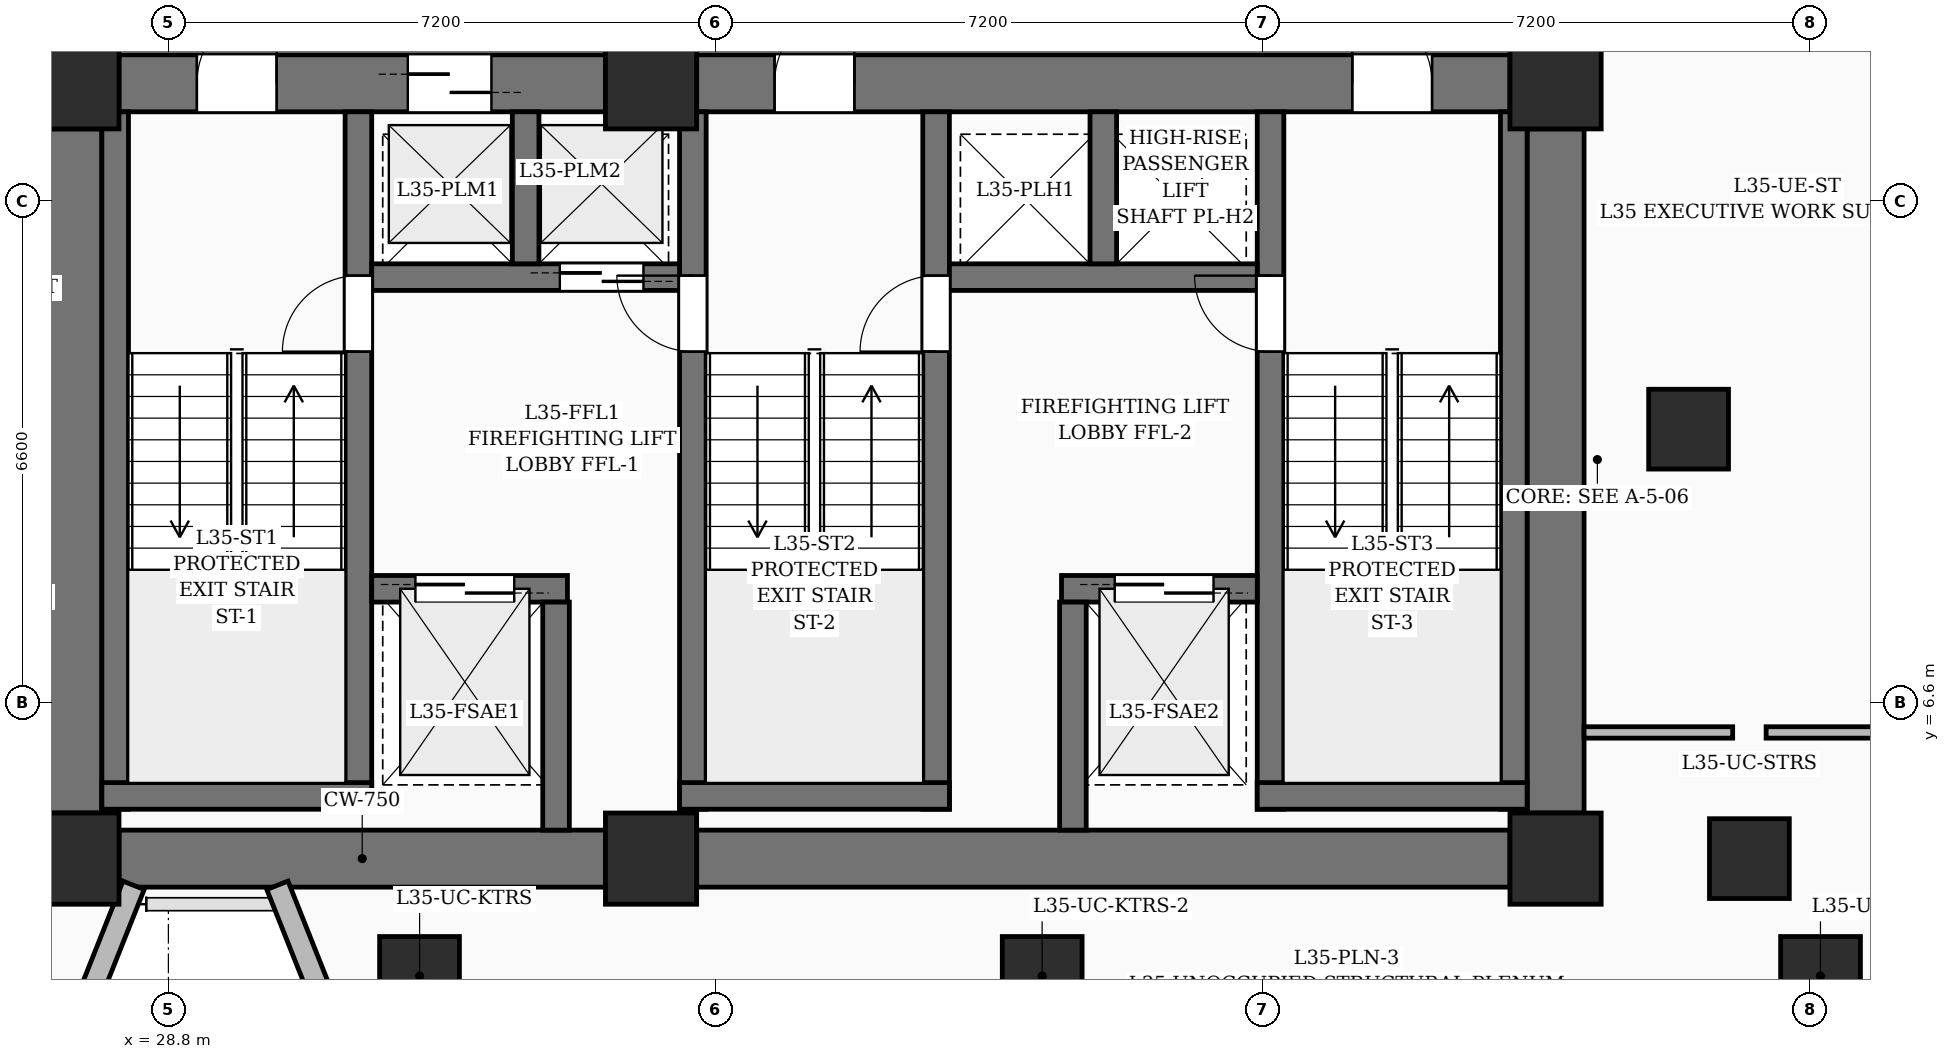
"""IFC4 building model, lengths in metres.
Left out: names, types, materials, properties, quantities, classifications, styles, units other than length and angle.
Written with IfcOpenShell. Run it as: python <this file> out.ifc"""

import sys

from ifc_helpers import new_model, si_unit, direction, frame, frame_2d, origin, origin_2d, place, context, subcontext, project, spatial, rectangle, extrude, element, fill, save


model = new_model("IFC4")
c1 = context("Model", 3, precision=1e-05, world=origin(), true_north=direction((0.0, 1.0)))
c2 = subcontext(c1, "Body", "Model", "MODEL_VIEW")
j1 = project(units=[si_unit("LENGTHUNIT", "METRE"), si_unit("PLANEANGLEUNIT", "RADIAN")], contexts=[c1])
p1 = place(None, origin())
s1 = spatial("IfcSite", under=j1, at=p1, CompositionType="ELEMENT")
p2 = place(p1, origin())
s2 = spatial("IfcBuilding", under=s1, at=p2, CompositionType="ELEMENT")
p3 = place(p2, frame((0.0, 0.0, 139.2)))
s3 = spatial("IfcBuildingStorey", under=s2, at=p3, CompositionType="ELEMENT", Elevation=139.2)
for number, where, z_axis, x_axis in (
    (1, (27.55, 4.55, 0.0), (0.0, 0.0, 1.0), (1.0, 0.0, 0.0)),
    (2, (35.15, 4.55, 0.0), (0.0, 0.0, 1.0), (1.0, 0.0, 0.0)),
    (3, (47.05, 4.55, 0.0), (0.0, 0.0, 1.0), (1.0, 0.0, 0.0)),
    (4, (27.55, 14.75, 0.0), (0.0, 0.0, 1.0), (1.0, 0.0, 0.0)),
    (5, (35.15, 14.75, 0.0), (0.0, 0.0, 1.0), (1.0, 0.0, 0.0)),
    (6, (47.05, 14.75, 0.0), (0.0, 0.0, 1.0), (1.0, 0.0, 0.0)),
):
    element("IfcColumn", number, at=place(p3, frame(where, z_axis=z_axis, x_axis=x_axis)), inside=s3, PredefinedType="COLUMN", context=c2, shape_type="SweptSolid", body=[
        extrude(rectangle(XDim=1.2, YDim=1.2, at=origin_2d()), origin(), (0.0, 0.0, 1.0), 3.6),
    ])
for number, where, z_axis, x_axis in (
    (7, (49.6, 4.55, 0.0), (0.0, 0.0, 1.0), (1.0, 0.0, 0.0)),
    (8, (48.8, 10.2, 0.0), (0.0, 0.0, 1.0), (1.0, 0.0, 0.0)),
):
    element("IfcColumn", number, at=place(p3, frame(where, z_axis=z_axis, x_axis=x_axis)), inside=s3, PredefinedType="COLUMN", context=c2, shape_type="SweptSolid", body=[
        extrude(rectangle(XDim=1.05, YDim=1.05, at=origin_2d()), origin(), (0.0, 0.0, 1.0), 3.6),
    ])
p4 = place(p3, frame((28.15, 4.55, 0.0), z_axis=(0.0, 0.0, 1.0), x_axis=(1.0, 0.0, 0.0)))
e9 = element("IfcWall", 9, at=p4, inside=s3, PredefinedType="SHEAR", context=c2, shape_type="SweptSolid", body=[
    extrude(rectangle(XDim=6.4, YDim=0.75, at=frame_2d((3.2, 0.0))), origin(), (0.0, 0.0, 1.0), 3.6),
])
p5 = place(p3, frame((35.75, 4.55, 0.0), z_axis=(0.0, 0.0, 1.0), x_axis=(1.0, 0.0, 0.0)))
e10 = element("IfcWall", 10, at=p5, inside=s3, PredefinedType="SHEAR", context=c2, shape_type="SweptSolid", body=[
    extrude(rectangle(XDim=10.7, YDim=0.75, at=frame_2d((5.35, 0.0))), origin(), (0.0, 0.0, 1.0), 3.6),
])
p6 = place(p3, frame((28.15, 14.75, 0.0), z_axis=(0.0, 0.0, 1.0), x_axis=(1.0, 0.0, 0.0)))
e11 = element("IfcWall", 11, at=p6, inside=s3, PredefinedType="SHEAR", context=c2, shape_type="SweptSolid", body=[
    extrude(rectangle(XDim=6.4, YDim=0.75, at=frame_2d((3.2, 0.0))), origin(), (0.0, 0.0, 1.0), 3.6),
])
p7 = place(p6, frame((1.025, 0.0, 0.0)))
e12 = element("IfcOpeningElement", 12, at=p7, cuts=e11, PredefinedType="OPENING", context=c2, shape_type="SweptSolid", body=[
    extrude(rectangle(XDim=1.05, YDim=2.15, at=frame_2d((0.525, 1.075))), frame((0.0, 0.385, 0.0), z_axis=(0.0, -1.0, 0.0), x_axis=(1.0, 0.0, 0.0)), (0.0, 0.0, 1.0), 0.77),
])
p8 = place(p6, frame((3.8, 0.0, 0.0)))
e13 = element("IfcOpeningElement", 13, at=p8, cuts=e11, PredefinedType="OPENING", context=c2, shape_type="SweptSolid", body=[
    extrude(rectangle(XDim=1.1, YDim=2.2, at=frame_2d((0.55, 1.1))), frame((0.0, 0.385, 0.0), z_axis=(0.0, -1.0, 0.0), x_axis=(1.0, 0.0, 0.0)), (0.0, 0.0, 1.0), 0.77),
])
p9 = place(p3, frame((35.75, 14.75, 0.0), z_axis=(0.0, 0.0, 1.0), x_axis=(1.0, 0.0, 0.0)))
e14 = element("IfcWall", 14, at=p9, inside=s3, PredefinedType="SHEAR", context=c2, shape_type="SweptSolid", body=[
    extrude(rectangle(XDim=10.7, YDim=0.75, at=frame_2d((5.35, 0.0))), origin(), (0.0, 0.0, 1.0), 3.6),
])
p10 = place(p9, frame((1.025, 0.0, 0.0)))
e15 = element("IfcOpeningElement", 15, at=p10, cuts=e14, PredefinedType="OPENING", context=c2, shape_type="SweptSolid", body=[
    extrude(rectangle(XDim=1.05, YDim=2.15, at=frame_2d((0.525, 1.075))), frame((0.0, 0.385, 0.0), z_axis=(0.0, -1.0, 0.0), x_axis=(1.0, 0.0, 0.0)), (0.0, 0.0, 1.0), 0.77),
])
p11 = place(p9, frame((8.625, 0.0, 0.0)))
e16 = element("IfcOpeningElement", 16, at=p11, cuts=e14, PredefinedType="OPENING", context=c2, shape_type="SweptSolid", body=[
    extrude(rectangle(XDim=1.05, YDim=2.15, at=frame_2d((0.525, 1.075))), frame((0.0, 0.385, 0.0), z_axis=(0.0, -1.0, 0.0), x_axis=(1.0, 0.0, 0.0)), (0.0, 0.0, 1.0), 0.77),
])
for number, where, z_axis, x_axis in (
    (17, (27.55, 5.15, 0.0), (0.0, 0.0, 1.0), (0.0, 1.0, 0.0)),
    (18, (47.05, 5.15, 0.0), (0.0, 0.0, 1.0), (0.0, 1.0, 0.0)),
):
    element("IfcWall", number, at=place(p3, frame(where, z_axis=z_axis, x_axis=x_axis)), inside=s3, PredefinedType="SHEAR", context=c2, shape_type="SweptSolid", body=[
        extrude(rectangle(XDim=9.0, YDim=0.75, at=frame_2d((4.5, 0.0))), origin(), (0.0, 0.0, 1.0), 3.6),
    ])
p12 = place(p3, frame((28.1, 5.2, 0.0), z_axis=(0.0, 0.0, 1.0), x_axis=(0.0, 1.0, 0.0)))
e19 = element("IfcWall", 19, at=p12, inside=s3, PredefinedType="SOLIDWALL", context=c2, shape_type="SweptSolid", body=[
    extrude(rectangle(XDim=9.175, YDim=0.35, at=frame_2d((4.587, 0.0))), origin(), (0.0, 0.0, 1.0), 3.6),
])
p13 = place(p3, frame((31.3, 5.2, 0.0), z_axis=(0.0, 0.0, 1.0), x_axis=(0.0, 1.0, 0.0)))
e20 = element("IfcWall", 20, at=p13, inside=s3, PredefinedType="SOLIDWALL", context=c2, shape_type="SweptSolid", body=[
    extrude(rectangle(XDim=9.175, YDim=0.35, at=frame_2d((4.587, 0.0))), origin(), (0.0, 0.0, 1.0), 3.6),
])
p14 = place(p13, frame((6.02, 0.0, 0.0)))
e21 = element("IfcOpeningElement", 21, at=p14, cuts=e20, PredefinedType="OPENING", context=c2, shape_type="SweptSolid", body=[
    extrude(rectangle(XDim=1.0, YDim=2.15, at=frame_2d((0.5, 1.075))), frame((0.0, 0.185, 0.0), z_axis=(0.0, -1.0, 0.0), x_axis=(1.0, 0.0, 0.0)), (0.0, 0.0, 1.0), 0.37),
])
p15 = place(p3, frame((27.925, 5.375, 0.0), z_axis=(0.0, 0.0, 1.0), x_axis=(1.0, 0.0, 0.0)))
e22 = element("IfcWall", 22, at=p15, inside=s3, PredefinedType="SOLIDWALL", context=c2, shape_type="SweptSolid", body=[
    extrude(rectangle(XDim=3.55, YDim=0.35, at=frame_2d((1.775, 0.0))), origin(), (0.0, 0.0, 1.0), 3.6),
])
p16 = place(p3, frame((35.7, 5.2, 0.0), z_axis=(0.0, 0.0, 1.0), x_axis=(0.0, 1.0, 0.0)))
e23 = element("IfcWall", 23, at=p16, inside=s3, PredefinedType="SOLIDWALL", context=c2, shape_type="SweptSolid", body=[
    extrude(rectangle(XDim=9.175, YDim=0.35, at=frame_2d((4.587, 0.0))), origin(), (0.0, 0.0, 1.0), 3.6),
])
p17 = place(p16, frame((6.02, 0.0, 0.0)))
e24 = element("IfcOpeningElement", 24, at=p17, cuts=e23, PredefinedType="OPENING", context=c2, shape_type="SweptSolid", body=[
    extrude(rectangle(XDim=1.0, YDim=2.15, at=frame_2d((0.5, 1.075))), frame((0.0, 0.185, 0.0), z_axis=(0.0, -1.0, 0.0), x_axis=(1.0, 0.0, 0.0)), (0.0, 0.0, 1.0), 0.37),
])
p18 = place(p3, frame((38.9, 5.2, 0.0), z_axis=(0.0, 0.0, 1.0), x_axis=(0.0, 1.0, 0.0)))
e25 = element("IfcWall", 25, at=p18, inside=s3, PredefinedType="SOLIDWALL", context=c2, shape_type="SweptSolid", body=[
    extrude(rectangle(XDim=9.175, YDim=0.35, at=frame_2d((4.587, 0.0))), origin(), (0.0, 0.0, 1.0), 3.6),
])
p19 = place(p18, frame((6.02, 0.0, 0.0)))
e26 = element("IfcOpeningElement", 26, at=p19, cuts=e25, PredefinedType="OPENING", context=c2, shape_type="SweptSolid", body=[
    extrude(rectangle(XDim=1.0, YDim=2.15, at=frame_2d((0.5, 1.075))), frame((0.0, 0.185, 0.0), z_axis=(0.0, -1.0, 0.0), x_axis=(1.0, 0.0, 0.0)), (0.0, 0.0, 1.0), 0.37),
])
p20 = place(p3, frame((35.525, 5.375, 0.0), z_axis=(0.0, 0.0, 1.0), x_axis=(1.0, 0.0, 0.0)))
e27 = element("IfcWall", 27, at=p20, inside=s3, PredefinedType="SOLIDWALL", context=c2, shape_type="SweptSolid", body=[
    extrude(rectangle(XDim=3.55, YDim=0.35, at=frame_2d((1.775, 0.0))), origin(), (0.0, 0.0, 1.0), 3.6),
])
p21 = place(p3, frame((43.3, 5.2, 0.0), z_axis=(0.0, 0.0, 1.0), x_axis=(0.0, 1.0, 0.0)))
e28 = element("IfcWall", 28, at=p21, inside=s3, PredefinedType="SOLIDWALL", context=c2, shape_type="SweptSolid", body=[
    extrude(rectangle(XDim=9.175, YDim=0.35, at=frame_2d((4.587, 0.0))), origin(), (0.0, 0.0, 1.0), 3.6),
])
p22 = place(p21, frame((6.02, 0.0, 0.0)))
e29 = element("IfcOpeningElement", 29, at=p22, cuts=e28, PredefinedType="OPENING", context=c2, shape_type="SweptSolid", body=[
    extrude(rectangle(XDim=1.0, YDim=2.15, at=frame_2d((0.5, 1.075))), frame((0.0, 0.185, 0.0), z_axis=(0.0, -1.0, 0.0), x_axis=(1.0, 0.0, 0.0)), (0.0, 0.0, 1.0), 0.37),
])
p23 = place(p3, frame((46.5, 5.2, 0.0), z_axis=(0.0, 0.0, 1.0), x_axis=(0.0, 1.0, 0.0)))
e30 = element("IfcWall", 30, at=p23, inside=s3, PredefinedType="SOLIDWALL", context=c2, shape_type="SweptSolid", body=[
    extrude(rectangle(XDim=9.175, YDim=0.35, at=frame_2d((4.587, 0.0))), origin(), (0.0, 0.0, 1.0), 3.6),
])
p24 = place(p3, frame((43.125, 5.375, 0.0), z_axis=(0.0, 0.0, 1.0), x_axis=(1.0, 0.0, 0.0)))
e31 = element("IfcWall", 31, at=p24, inside=s3, PredefinedType="SOLIDWALL", context=c2, shape_type="SweptSolid", body=[
    extrude(rectangle(XDim=3.55, YDim=0.35, at=frame_2d((1.775, 0.0))), origin(), (0.0, 0.0, 1.0), 3.6),
])
p25 = place(p3, frame((31.475, 8.1, 0.0), z_axis=(0.0, 0.0, 1.0), x_axis=(1.0, 0.0, 0.0)))
e32 = element("IfcWall", 32, at=p25, inside=s3, PredefinedType="SOLIDWALL", context=c2, shape_type="SweptSolid", body=[
    extrude(rectangle(XDim=2.575, YDim=0.35, at=frame_2d((1.288, 0.0))), origin(), (0.0, 0.0, 1.0), 3.6),
])
p26 = place(p25, frame((0.575, 0.0, 0.0)))
e33 = element("IfcOpeningElement", 33, at=p26, cuts=e32, PredefinedType="OPENING", context=c2, shape_type="SweptSolid", body=[
    extrude(rectangle(XDim=1.3, YDim=2.25, at=frame_2d((0.65, 1.125))), frame((0.0, 0.185, 0.0), z_axis=(0.0, -1.0, 0.0), x_axis=(1.0, 0.0, 0.0)), (0.0, 0.0, 1.0), 0.37),
])
p27 = place(p3, frame((40.55, 8.1, 0.0), z_axis=(0.0, 0.0, 1.0), x_axis=(1.0, 0.0, 0.0)))
e34 = element("IfcWall", 34, at=p27, inside=s3, PredefinedType="SOLIDWALL", context=c2, shape_type="SweptSolid", body=[
    extrude(rectangle(XDim=2.575, YDim=0.35, at=frame_2d((1.288, 0.0))), origin(), (0.0, 0.0, 1.0), 3.6),
])
p28 = place(p27, frame((0.7, 0.0, 0.0)))
e35 = element("IfcOpeningElement", 35, at=p28, cuts=e34, PredefinedType="OPENING", context=c2, shape_type="SweptSolid", body=[
    extrude(rectangle(XDim=1.3, YDim=2.25, at=frame_2d((0.65, 1.125))), frame((0.0, 0.185, 0.0), z_axis=(0.0, -1.0, 0.0), x_axis=(1.0, 0.0, 0.0)), (0.0, 0.0, 1.0), 0.37),
])
for number, where, z_axis, x_axis in (
    (36, (33.9, 4.925, 0.0), (0.0, 0.0, 1.0), (0.0, 1.0, 0.0)),
    (37, (40.7, 4.925, 0.0), (0.0, 0.0, 1.0), (0.0, 1.0, 0.0)),
):
    element("IfcWall", number, at=place(p3, frame(where, z_axis=z_axis, x_axis=x_axis)), inside=s3, PredefinedType="SOLIDWALL", context=c2, shape_type="SweptSolid", body=[
        extrude(rectangle(XDim=3.0, YDim=0.35, at=frame_2d((1.5, 0.0))), origin(), (0.0, 0.0, 1.0), 3.6),
    ])
p29 = place(p3, frame((31.475, 12.2, 0.0), z_axis=(0.0, 0.0, 1.0), x_axis=(1.0, 0.0, 0.0)))
e38 = element("IfcWall", 38, at=p29, inside=s3, PredefinedType="SOLIDWALL", context=c2, shape_type="SweptSolid", body=[
    extrude(rectangle(XDim=4.05, YDim=0.35, at=frame_2d((2.025, 0.0))), origin(), (0.0, 0.0, 1.0), 3.6),
])
p30 = place(p29, frame((2.475, 0.0, 0.0)))
e39 = element("IfcOpeningElement", 39, at=p30, cuts=e38, PredefinedType="OPENING", context=c2, shape_type="SweptSolid", body=[
    extrude(rectangle(XDim=1.1, YDim=2.2, at=frame_2d((0.55, 1.1))), frame((0.0, 0.185, 0.0), z_axis=(0.0, -1.0, 0.0), x_axis=(1.0, 0.0, 0.0)), (0.0, 0.0, 1.0), 0.37),
])
p31 = place(p3, frame((33.5, 12.375, 0.0), z_axis=(0.0, 0.0, 1.0), x_axis=(0.0, 1.0, 0.0)))
e40 = element("IfcWall", 40, at=p31, inside=s3, PredefinedType="SOLIDWALL", context=c2, shape_type="SweptSolid", body=[
    extrude(rectangle(XDim=2.0, YDim=0.35, at=frame_2d((1.0, 0.0))), origin(), (0.0, 0.0, 1.0), 3.6),
])
p32 = place(p3, frame((39.075, 12.2, 0.0), z_axis=(0.0, 0.0, 1.0), x_axis=(1.0, 0.0, 0.0)))
e41 = element("IfcWall", 41, at=p32, inside=s3, PredefinedType="SOLIDWALL", context=c2, shape_type="SweptSolid", body=[
    extrude(rectangle(XDim=4.05, YDim=0.35, at=frame_2d((2.025, 0.0))), origin(), (0.0, 0.0, 1.0), 3.6),
])
p33 = place(p3, frame((41.1, 12.375, 0.0), z_axis=(0.0, 0.0, 1.0), x_axis=(0.0, 1.0, 0.0)))
e42 = element("IfcWall", 42, at=p33, inside=s3, PredefinedType="SOLIDWALL", context=c2, shape_type="SweptSolid", body=[
    extrude(rectangle(XDim=2.0, YDim=0.35, at=frame_2d((1.0, 0.0))), origin(), (0.0, 0.0, 1.0), 3.6),
])
for number, where, z_axis, x_axis in (
    (43, (32.104, 3.0, 0.0), (0.0, 0.0, 1.0), (1.0, 0.0, 0.0)),
    (44, (40.296, 3.0, 0.0), (0.0, 0.0, 1.0), (1.0, 0.0, 0.0)),
    (45, (50.536, 3.0, 0.0), (0.0, 0.0, 1.0), (1.0, 0.0, 0.0)),
):
    element("IfcColumn", number, at=place(p3, frame(where, z_axis=z_axis, x_axis=x_axis)), inside=s3, PredefinedType="COLUMN", context=c2, shape_type="SweptSolid", body=[
        extrude(rectangle(XDim=1.05, YDim=1.05, at=origin_2d()), origin(), (0.0, 0.0, 1.0), 3.6),
    ])
p34 = place(p3, frame((31.136, 1.93, 0.0), z_axis=(0.0, 0.0, 1.0), x_axis=(-0.369562555971, 0.929205852986, 0.0)))
e46 = element("IfcWall", 46, at=p34, inside=s3, PredefinedType="SOLIDWALL", context=c2, shape_type="SweptSolid", body=[
    extrude(rectangle(XDim=2.442, YDim=0.3, at=frame_2d((1.221, 0.0))), origin(), (0.0, 0.0, 1.0), 2.575),
])
p35 = place(p3, frame((28.342, 4.199, 0.0), z_axis=(0.0, 0.0, 1.0), x_axis=(-0.36956502288, -0.929204871847, 0.0)))
e47 = element("IfcWall", 47, at=p35, inside=s3, PredefinedType="SOLIDWALL", context=c2, shape_type="SweptSolid", body=[
    extrude(rectangle(XDim=2.722, YDim=0.3, at=frame_2d((1.361, 0.0))), origin(), (0.0, 0.0, 1.0), 2.575),
])
p36 = place(p3, frame((47.425, 14.2, 0.0), z_axis=(0.0, 0.0, 1.0), x_axis=(0.068484119878, 0.997652206595, 0.0)))
e48 = element("IfcWall", 48, at=p36, inside=s3, PredefinedType="PARTITIONING", context=c2, shape_type="SweptSolid", body=[
    extrude(rectangle(XDim=2.556, YDim=0.2, at=frame_2d((1.278, 0.0))), origin(), (0.0, 0.0, 1.0), 2.393),
])
p37 = place(p36, frame((1.172, 0.0, 0.0)))
e49 = element("IfcOpeningElement", 49, at=p37, cuts=e48, PredefinedType="OPENING", context=c2, shape_type="SweptSolid", body=[
    extrude(rectangle(XDim=0.9, YDim=2.1, at=frame_2d((0.45, 1.05))), frame((0.0, 0.11, 0.0), z_axis=(0.0, -1.0, 0.0), x_axis=(1.0, 0.0, 0.0)), (0.0, 0.0, 1.0), 0.22),
])
p38 = place(p3, frame((49.38, 6.21, 0.0), z_axis=(0.0, 0.0, 1.0), x_axis=(-1.0, 0.0, 0.0)))
e50 = element("IfcWall", 50, at=p38, inside=s3, PredefinedType="PARTITIONING", context=c2, shape_type="SweptSolid", body=[
    extrude(rectangle(XDim=1.955, YDim=0.15, at=frame_2d((0.978, 0.0))), origin(), (0.0, 0.0, 1.0), 2.436),
])
p39 = place(p3, frame((52.92, 6.21, 0.0), z_axis=(0.0, 0.0, 1.0), x_axis=(-1.0, 0.0, 0.0)))
e51 = element("IfcWall", 51, at=p39, inside=s3, PredefinedType="PARTITIONING", context=c2, shape_type="SweptSolid", body=[
    extrude(rectangle(XDim=3.1, YDim=0.15, at=frame_2d((1.55, 0.0))), origin(), (0.0, 0.0, 1.0), 2.57),
])
p40 = place(p7, origin())
e52 = element("IfcDoor", 52, at=p40, inside=s3, OperationType="SINGLE_SWING_RIGHT", PredefinedType="DOOR", context=c2, shape_type="SweptSolid", body=[
    extrude(rectangle(XDim=1.05, YDim=2.15, at=frame_2d((0.525, 1.075))), frame((0.0, 0.025, 0.0), z_axis=(0.0, -1.0, 0.0), x_axis=(1.0, 0.0, 0.0)), (0.0, 0.0, 1.0), 0.05),
])
fill(e12, e52)
p41 = place(p10, origin())
e53 = element("IfcDoor", 53, at=p41, inside=s3, OperationType="SINGLE_SWING_RIGHT", PredefinedType="DOOR", context=c2, shape_type="SweptSolid", body=[
    extrude(rectangle(XDim=1.05, YDim=2.15, at=frame_2d((0.525, 1.075))), frame((0.0, 0.025, 0.0), z_axis=(0.0, -1.0, 0.0), x_axis=(1.0, 0.0, 0.0)), (0.0, 0.0, 1.0), 0.05),
])
fill(e15, e53)
p42 = place(p11, origin())
e54 = element("IfcDoor", 54, at=p42, inside=s3, OperationType="SINGLE_SWING_LEFT", PredefinedType="DOOR", context=c2, shape_type="SweptSolid", body=[
    extrude(rectangle(XDim=1.05, YDim=2.15, at=frame_2d((0.525, 1.075))), frame((0.0, 0.025, 0.0), z_axis=(0.0, -1.0, 0.0), x_axis=(1.0, 0.0, 0.0)), (0.0, 0.0, 1.0), 0.05),
])
fill(e16, e54)
p43 = place(p14, origin())
e55 = element("IfcDoor", 55, at=p43, inside=s3, OperationType="SINGLE_SWING_LEFT", PredefinedType="DOOR", context=c2, shape_type="SweptSolid", body=[
    extrude(rectangle(XDim=1.0, YDim=2.15, at=frame_2d((0.5, 1.075))), frame((0.0, 0.025, 0.0), z_axis=(0.0, -1.0, 0.0), x_axis=(1.0, 0.0, 0.0)), (0.0, 0.0, 1.0), 0.05),
])
fill(e21, e55)
p44 = place(p17, origin())
e56 = element("IfcDoor", 56, at=p44, inside=s3, OperationType="SINGLE_SWING_RIGHT", PredefinedType="DOOR", context=c2, shape_type="SweptSolid", body=[
    extrude(rectangle(XDim=1.0, YDim=2.15, at=frame_2d((0.5, 1.075))), frame((0.0, 0.025, 0.0), z_axis=(0.0, -1.0, 0.0), x_axis=(1.0, 0.0, 0.0)), (0.0, 0.0, 1.0), 0.05),
])
fill(e24, e56)
p45 = place(p19, origin())
e57 = element("IfcDoor", 57, at=p45, inside=s3, OperationType="SINGLE_SWING_LEFT", PredefinedType="DOOR", context=c2, shape_type="SweptSolid", body=[
    extrude(rectangle(XDim=1.0, YDim=2.15, at=frame_2d((0.5, 1.075))), frame((0.0, 0.025, 0.0), z_axis=(0.0, -1.0, 0.0), x_axis=(1.0, 0.0, 0.0)), (0.0, 0.0, 1.0), 0.05),
])
fill(e26, e57)
p46 = place(p22, origin())
e58 = element("IfcDoor", 58, at=p46, inside=s3, OperationType="SINGLE_SWING_RIGHT", PredefinedType="DOOR", context=c2, shape_type="SweptSolid", body=[
    extrude(rectangle(XDim=1.0, YDim=2.15, at=frame_2d((0.5, 1.075))), frame((0.0, 0.025, 0.0), z_axis=(0.0, -1.0, 0.0), x_axis=(1.0, 0.0, 0.0)), (0.0, 0.0, 1.0), 0.05),
])
fill(e29, e58)
p47 = place(p26, origin())
e59 = element("IfcDoor", 59, at=p47, inside=s3, OperationType="DOUBLE_DOOR_SLIDING", PredefinedType="DOOR", context=c2, shape_type="SweptSolid", body=[
    extrude(rectangle(XDim=1.3, YDim=2.25, at=frame_2d((0.65, 1.125))), frame((0.0, 0.025, 0.0), z_axis=(0.0, -1.0, 0.0), x_axis=(1.0, 0.0, 0.0)), (0.0, 0.0, 1.0), 0.05),
])
fill(e33, e59)
p48 = place(p28, origin())
e60 = element("IfcDoor", 60, at=p48, inside=s3, OperationType="DOUBLE_DOOR_SLIDING", PredefinedType="DOOR", context=c2, shape_type="SweptSolid", body=[
    extrude(rectangle(XDim=1.3, YDim=2.25, at=frame_2d((0.65, 1.125))), frame((0.0, 0.025, 0.0), z_axis=(0.0, -1.0, 0.0), x_axis=(1.0, 0.0, 0.0)), (0.0, 0.0, 1.0), 0.05),
])
fill(e35, e60)
p49 = place(p8, origin())
e61 = element("IfcDoor", 61, at=p49, inside=s3, OperationType="DOUBLE_DOOR_SLIDING", PredefinedType="DOOR", context=c2, shape_type="SweptSolid", body=[
    extrude(rectangle(XDim=1.1, YDim=2.2, at=frame_2d((0.55, 1.1))), frame((0.0, 0.025, 0.0), z_axis=(0.0, -1.0, 0.0), x_axis=(1.0, 0.0, 0.0)), (0.0, 0.0, 1.0), 0.05),
])
fill(e13, e61)
p50 = place(p30, origin())
e62 = element("IfcDoor", 62, at=p50, inside=s3, OperationType="DOUBLE_DOOR_SLIDING", PredefinedType="DOOR", context=c2, shape_type="SweptSolid", body=[
    extrude(rectangle(XDim=1.1, YDim=2.2, at=frame_2d((0.55, 1.1))), frame((0.0, 0.025, 0.0), z_axis=(0.0, -1.0, 0.0), x_axis=(1.0, 0.0, 0.0)), (0.0, 0.0, 1.0), 0.05),
])
fill(e39, e62)
save(model, sys.argv[1])
